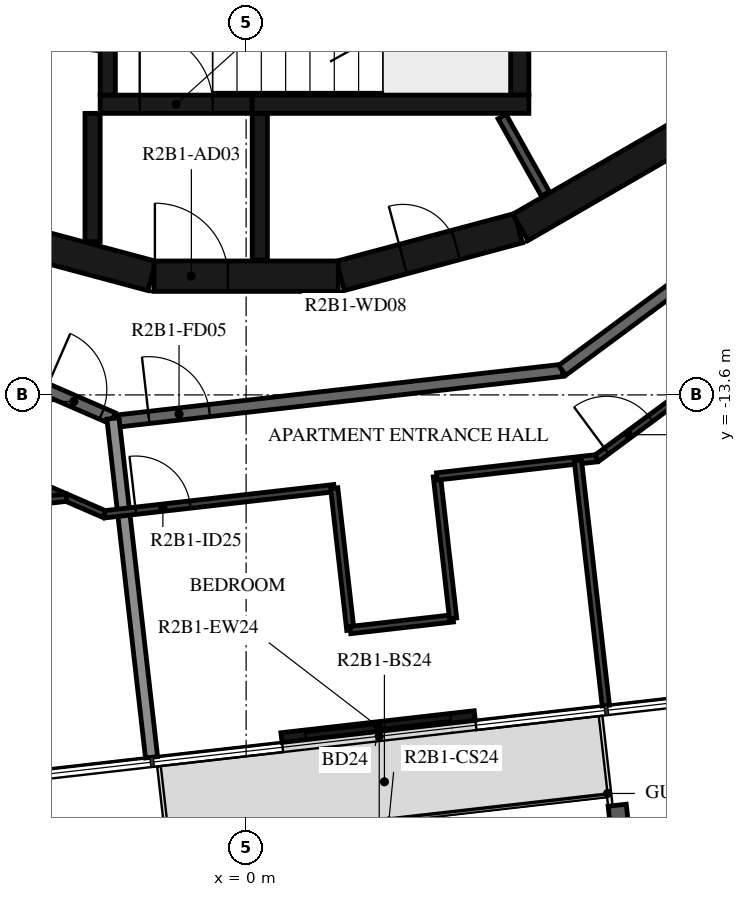
"""IFC4 building model, lengths in metres.
Left out: names, types, materials, properties, quantities, classifications, styles, units other than length and angle.
Written with IfcOpenShell. Run it as: python <this file> out.ifc"""

import sys

from ifc_helpers import new_model, si_unit, direction, frame, frame_2d, origin, origin_2d, place, context, subcontext, project, spatial, rectangle, i_section, extrude, element, fill, save


model = new_model("IFC4")
c1 = context("Model", 3, precision=1e-05, world=origin(), true_north=direction((0.0, 1.0)))
c2 = subcontext(c1, "Body", "Model", "MODEL_VIEW")
j1 = project(units=[si_unit("LENGTHUNIT", "METRE"), si_unit("PLANEANGLEUNIT", "RADIAN")], contexts=[c1])
p1 = place(None, origin())
s1 = spatial("IfcSite", under=j1, at=p1, CompositionType="ELEMENT")
p2 = place(p1, origin())
s2 = spatial("IfcBuilding", under=s1, at=p2, CompositionType="ELEMENT")
p3 = place(p2, frame((0.0, 0.0, 87.2)))
s3 = spatial("IfcBuildingStorey", under=s2, at=p3, CompositionType="ELEMENT", Elevation=87.2)
p4 = place(p3, frame((6.153, -20.795, -0.38), z_axis=(0.0, 0.0, 1.0), x_axis=(-0.993571881569, -0.113202986513, 0.0)))
e1 = element("IfcColumn", 1, at=p4, inside=s3, PredefinedType="COLUMN", context=c2, shape_type="SweptSolid", body=[
    extrude(i_section(OverallWidth=0.3, OverallDepth=0.9, WebThickness=0.019, FlangeThickness=0.035, FilletRadius=0.03, at=origin_2d()), origin(), (0.0, 0.0, 1.0), 3.5),
])
p5 = place(p3, frame((0.581, -19.235, 0.0), z_axis=(0.0, 0.0, 1.0), x_axis=(0.993569997097, 0.113219525124, 0.0)))
e2 = element("IfcWall", 2, at=p5, inside=s3, PredefinedType="STANDARD", context=c2, shape_type="SweptSolid", body=[
    extrude(rectangle(XDim=3.2, YDim=0.16, at=frame_2d((1.6, 0.0))), origin(), (0.0, 0.0, 1.0), 3.12),
])
p6 = place(p5, frame((0.4, 0.0, 0.0)))
e3 = element("IfcOpeningElement", 3, at=p6, cuts=e2, PredefinedType="OPENING", context=c2, shape_type="SweptSolid", body=[
    extrude(rectangle(XDim=2.4, YDim=2.4, at=frame_2d((1.2, 1.2))), frame((0.0, 0.09, 0.0), z_axis=(0.0, -1.0, 0.0), x_axis=(1.0, 0.0, 0.0)), (0.0, 0.0, 1.0), 0.18),
])
p7 = place(p3, frame((1.55, -11.643, 0.0), z_axis=(0.0, 0.0, 1.0), x_axis=(0.965948410781, 0.258734743916, 0.0)))
e4 = element("IfcWall", 4, at=p7, inside=s3, PredefinedType="SHEAR", context=c2, shape_type="SweptSolid", body=[
    extrude(rectangle(XDim=3.033, YDim=0.5, at=frame_2d((1.516, 0.0))), origin(), (0.0, 0.0, 1.0), 3.12),
])
p8 = place(p7, frame((1.066, 0.0, 0.0)))
e5 = element("IfcOpeningElement", 5, at=p8, cuts=e4, PredefinedType="OPENING", context=c2, shape_type="SweptSolid", body=[
    extrude(rectangle(XDim=0.9, YDim=2.1, at=frame_2d((0.45, 1.05))), frame((0.0, 0.26, 0.0), z_axis=(0.0, -1.0, 0.0), x_axis=(1.0, 0.0, 0.0)), (0.0, 0.0, 1.0), 0.52),
])
for number, where, z_axis, x_axis in (
    (6, (4.51, -10.845, 0.0), (0.0, 0.0, 1.0), (0.866, 0.5, 0.0)),
    (7, (-4.479, -10.858, 0.0), (0.0, 0.0, 1.0), (0.966, -0.259, 0.0)),
):
    element("IfcWall", number, at=place(p3, frame(where, z_axis=z_axis, x_axis=x_axis)), inside=s3, PredefinedType="SHEAR", context=c2, shape_type="SweptSolid", body=[
        extrude(rectangle(XDim=3.033, YDim=0.5, at=frame_2d((1.516, 0.0))), origin(), (0.0, 0.0, 1.0), 3.12),
    ])
p9 = place(p3, frame((-1.516, -11.647, 0.0), z_axis=(0.0, 0.0, 1.0), x_axis=(1.0, 0.0, 0.0)))
e8 = element("IfcWall", 8, at=p9, inside=s3, PredefinedType="SHEAR", context=c2, shape_type="SweptSolid", body=[
    extrude(rectangle(XDim=3.033, YDim=0.5, at=frame_2d((1.516, 0.0))), origin(), (0.0, 0.0, 1.0), 3.12),
])
p10 = place(p9, frame((0.016, 0.0, 0.0)))
e9 = element("IfcOpeningElement", 9, at=p10, cuts=e8, PredefinedType="OPENING", context=c2, shape_type="SweptSolid", body=[
    extrude(rectangle(XDim=1.2, YDim=2.1, at=frame_2d((0.6, 1.05))), frame((0.0, 0.26, 0.0), z_axis=(0.0, -1.0, 0.0), x_axis=(1.0, 0.0, 0.0)), (0.0, 0.0, 1.0), 0.52),
])
p11 = place(p3, frame((-2.275, -8.67, 0.0), z_axis=(0.0, 0.0, 1.0), x_axis=(0.0, 1.0, 0.0)))
e10 = element("IfcWall", 10, at=p11, inside=s3, PredefinedType="SHEAR", context=c2, shape_type="SweptSolid", body=[
    extrude(rectangle(XDim=3.32, YDim=0.25, at=frame_2d((1.66, 0.0))), origin(), (0.0, 0.0, 1.0), 3.12),
])
p12 = place(p3, frame((4.5, -8.67, 0.0), z_axis=(0.0, 0.0, 1.0), x_axis=(0.0, 1.0, 0.0)))
e11 = element("IfcWall", 11, at=p12, inside=s3, PredefinedType="SHEAR", context=c2, shape_type="SweptSolid", body=[
    extrude(rectangle(XDim=3.32, YDim=0.3, at=frame_2d((1.66, 0.0))), origin(), (0.0, 0.0, 1.0), 3.12),
])
p13 = place(p3, frame((0.1, -8.82, 0.0), z_axis=(0.0, 0.0, 1.0), x_axis=(1.0, 0.0, 0.0)))
e12 = element("IfcWall", 12, at=p13, inside=s3, PredefinedType="SHEAR", context=c2, shape_type="SweptSolid", body=[
    extrude(rectangle(XDim=4.55, YDim=0.3, at=frame_2d((2.275, 0.0))), origin(), (0.0, 0.0, 1.0), 3.12),
])
p14 = place(p3, frame((-2.4, -8.82, 0.0), z_axis=(0.0, 0.0, 1.0), x_axis=(1.0, 0.0, 0.0)))
e13 = element("IfcWall", 13, at=p14, inside=s3, PredefinedType="SHEAR", context=c2, shape_type="SweptSolid", body=[
    extrude(rectangle(XDim=2.5, YDim=0.3, at=frame_2d((1.25, 0.0))), origin(), (0.0, 0.0, 1.0), 3.12),
])
p15 = place(p14, frame((0.65, 0.0, 0.0)))
e14 = element("IfcOpeningElement", 14, at=p15, cuts=e13, PredefinedType="OPENING", context=c2, shape_type="SweptSolid", body=[
    extrude(rectangle(XDim=1.2, YDim=2.1, at=frame_2d((0.6, 1.05))), frame((0.0, 0.16, 0.0), z_axis=(0.0, -1.0, 0.0), x_axis=(1.0, 0.0, 0.0)), (0.0, 0.0, 1.0), 0.32),
])
p16 = place(p3, frame((-2.525, -8.97, 0.0), z_axis=(0.0, 0.0, 1.0), x_axis=(0.0, -1.0, 0.0)))
e15 = element("IfcWall", 15, at=p16, inside=s3, PredefinedType="SHEAR", context=c2, shape_type="SweptSolid", body=[
    extrude(rectangle(XDim=2.11, YDim=0.25, at=frame_2d((1.055, 0.0))), origin(), (0.0, 0.0, 1.0), 3.12),
])
p17 = place(p3, frame((0.225, -8.97, 0.0), z_axis=(0.0, 0.0, 1.0), x_axis=(0.0, -1.0, 0.0)))
e16 = element("IfcWall", 16, at=p17, inside=s3, PredefinedType="SHEAR", context=c2, shape_type="SweptSolid", body=[
    extrude(rectangle(XDim=2.41, YDim=0.25, at=frame_2d((1.205, 0.0))), origin(), (0.0, 0.0, 1.0), 3.12),
])
p18 = place(p3, frame((4.922, -10.296, 0.0), z_axis=(0.0, 0.0, 1.0), x_axis=(-0.48860846254, 0.872503163509, 0.0)))
e17 = element("IfcWall", 17, at=p18, inside=s3, PredefinedType="PARTITIONING", context=c2, shape_type="SweptSolid", body=[
    extrude(rectangle(XDim=1.459, YDim=0.15, at=frame_2d((0.73, 0.0))), origin(), (0.0, 0.0, 1.0), 3.12),
])
p19 = place(p3, frame((-8.829, -11.1, 0.0), z_axis=(0.0, 0.0, 1.0), x_axis=(0.917063622491, -0.398740908742, 0.0)))
e18 = element("IfcWall", 18, at=p19, inside=s3, PredefinedType="STANDARD", context=c2, shape_type="SweptSolid", body=[
    extrude(rectangle(XDim=7.24, YDim=0.2, at=frame_2d((3.62, 0.0))), origin(), (0.0, 0.0, 1.0), 3.12),
])
p20 = place(p19, frame((6.04, 0.0, 0.0)))
e19 = element("IfcOpeningElement", 19, at=p20, cuts=e18, PredefinedType="OPENING", context=c2, shape_type="SweptSolid", body=[
    extrude(rectangle(XDim=1.0, YDim=2.1, at=frame_2d((0.5, 1.05))), frame((0.0, 0.11, 0.0), z_axis=(0.0, -1.0, 0.0), x_axis=(1.0, 0.0, 0.0)), (0.0, 0.0, 1.0), 0.22),
])
p21 = place(p3, frame((-2.096, -14.028, 0.0), z_axis=(0.0, 0.0, 1.0), x_axis=(0.993569170114, 0.113226782163, 0.0)))
e20 = element("IfcWall", 20, at=p21, inside=s3, PredefinedType="STANDARD", context=c2, shape_type="SweptSolid", body=[
    extrude(rectangle(XDim=7.342, YDim=0.2, at=frame_2d((3.671, 0.0))), origin(), (0.0, 0.0, 1.0), 3.12),
])
p22 = place(p21, frame((0.5, 0.0, 0.0)))
e21 = element("IfcOpeningElement", 21, at=p22, cuts=e20, PredefinedType="OPENING", context=c2, shape_type="SweptSolid", body=[
    extrude(rectangle(XDim=1.0, YDim=2.1, at=frame_2d((0.5, 1.05))), frame((0.0, 0.11, 0.0), z_axis=(0.0, -1.0, 0.0), x_axis=(1.0, 0.0, 0.0)), (0.0, 0.0, 1.0), 0.22),
])
p23 = place(p3, frame((5.198, -13.196, 0.0), z_axis=(0.0, 0.0, 1.0), x_axis=(0.803869883159, 0.594805187394, 0.0)))
e22 = element("IfcWall", 22, at=p23, inside=s3, PredefinedType="STANDARD", context=c2, shape_type="SweptSolid", body=[
    extrude(rectangle(XDim=7.342, YDim=0.2, at=frame_2d((3.671, 0.0))), origin(), (0.0, 0.0, 1.0), 3.12),
])
p24 = place(p3, frame((-1.555, -19.559, 0.0), z_axis=(0.0, 0.0, 1.0), x_axis=(-0.113221250863, 0.993569800443, 0.0)))
e23 = element("IfcWall", 23, at=p24, inside=s3, PredefinedType="STANDARD", context=c2, shape_type="SweptSolid", body=[
    extrude(rectangle(XDim=5.609, YDim=0.2, at=frame_2d((2.804, 0.0))), origin(), (0.0, 0.0, 1.0), 2.73),
])
p25 = place(p3, frame((-9.796, -12.315, 0.0), z_axis=(0.0, 0.0, 1.0), x_axis=(0.917059572812, -0.398750222463, 0.0)))
e24 = element("IfcWall", 24, at=p25, inside=s3, PredefinedType="PARTITIONING", context=c2, shape_type="SweptSolid", body=[
    extrude(rectangle(XDim=8.146, YDim=0.12, at=frame_2d((4.073, 0.0))), origin(), (0.0, 0.0, 1.0), 3.12),
])
p26 = place(p25, frame((0.969, 0.0, 0.0)))
e25 = element("IfcOpeningElement", 25, at=p26, cuts=e24, PredefinedType="OPENING", context=c2, shape_type="SweptSolid", body=[
    extrude(rectangle(XDim=0.8, YDim=2.1, at=frame_2d((0.4, 1.05))), frame((0.0, 0.07, 0.0), z_axis=(0.0, -1.0, 0.0), x_axis=(1.0, 0.0, 0.0)), (0.0, 0.0, 1.0), 0.14),
])
p27 = place(p3, frame((-2.326, -15.563, 0.0), z_axis=(0.0, 0.0, 1.0), x_axis=(0.993575068384, 0.113175012641, 0.0)))
e26 = element("IfcWall", 26, at=p27, inside=s3, PredefinedType="PARTITIONING", context=c2, shape_type="SweptSolid", body=[
    extrude(rectangle(XDim=3.799, YDim=0.12, at=frame_2d((1.899, 0.0))), origin(), (0.0, 0.0, 1.0), 3.12),
])
p28 = place(p27, frame((0.513, 0.0, 0.0)))
e27 = element("IfcOpeningElement", 27, at=p28, cuts=e26, PredefinedType="OPENING", context=c2, shape_type="SweptSolid", body=[
    extrude(rectangle(XDim=0.9, YDim=2.1, at=frame_2d((0.45, 1.05))), frame((0.0, 0.07, 0.0), z_axis=(0.0, -1.0, 0.0), x_axis=(1.0, 0.0, 0.0)), (0.0, 0.0, 1.0), 0.14),
])
p29 = place(p3, frame((-17.437, -16.94, 0.0), z_axis=(0.0, 0.0, 1.0), x_axis=(0.993573314119, 0.113190412448, 0.0)))
e28 = element("IfcWall", 28, at=p29, inside=s3, PredefinedType="PARTITIONING", context=c2, shape_type="SweptSolid", body=[
    extrude(rectangle(XDim=14.576, YDim=0.12, at=frame_2d((7.288, 0.0))), origin(), (0.0, 0.0, 1.0), 3.12),
])
p30 = place(p29, frame((3.201, 0.0, 0.0)))
e29 = element("IfcOpeningElement", 29, at=p30, cuts=e28, PredefinedType="OPENING", context=c2, shape_type="SweptSolid", body=[
    extrude(rectangle(XDim=0.9, YDim=2.1, at=frame_2d((0.45, 1.05))), frame((0.0, 0.07, 0.0), z_axis=(0.0, -1.0, 0.0), x_axis=(1.0, 0.0, 0.0)), (0.0, 0.0, 1.0), 0.14),
])
p31 = place(p29, frame((0.2, 0.0, 0.0)))
e30 = element("IfcOpeningElement", 30, at=p31, cuts=e28, PredefinedType="OPENING", context=c2, shape_type="SweptSolid", body=[
    extrude(rectangle(XDim=0.9, YDim=2.1, at=frame_2d((0.45, 1.05))), frame((0.0, 0.07, 0.0), z_axis=(0.0, -1.0, 0.0), x_axis=(1.0, 0.0, 0.0)), (0.0, 0.0, 1.0), 0.14),
])
p32 = place(p3, frame((1.448, -15.133, 0.0), z_axis=(0.0, 0.0, 1.0), x_axis=(0.113180189053, -0.993574478741, 0.0)))
e31 = element("IfcWall", 31, at=p32, inside=s3, PredefinedType="PARTITIONING", context=c2, shape_type="SweptSolid", body=[
    extrude(rectangle(XDim=2.349, YDim=0.12, at=frame_2d((1.175, 0.0))), origin(), (0.0, 0.0, 1.0), 3.12),
])
p33 = place(p3, frame((1.714, -17.467, 0.0), z_axis=(0.0, 0.0, 1.0), x_axis=(0.993577030812, 0.113157782957, 0.0)))
e32 = element("IfcWall", 32, at=p33, inside=s3, PredefinedType="PARTITIONING", context=c2, shape_type="SweptSolid", body=[
    extrude(rectangle(XDim=1.7, YDim=0.12, at=frame_2d((0.85, 0.0))), origin(), (0.0, 0.0, 1.0), 3.12),
])
p34 = place(p3, frame((3.404, -17.275, 0.0), z_axis=(0.0, 0.0, 1.0), x_axis=(-0.113180189053, 0.993574478741, 0.0)))
e33 = element("IfcWall", 33, at=p34, inside=s3, PredefinedType="PARTITIONING", context=c2, shape_type="SweptSolid", body=[
    extrude(rectangle(XDim=2.349, YDim=0.12, at=frame_2d((1.175, 0.0))), origin(), (0.0, 0.0, 1.0), 3.12),
])
p35 = place(p3, frame((3.138, -14.941, 0.0), z_axis=(0.0, 0.0, 1.0), x_axis=(0.99356355736, 0.113276023437, 0.0)))
e34 = element("IfcWall", 34, at=p35, inside=s3, PredefinedType="PARTITIONING", context=c2, shape_type="SweptSolid", body=[
    extrude(rectangle(XDim=2.647, YDim=0.12, at=frame_2d((1.323, 0.0))), origin(), (0.0, 0.0, 1.0), 3.12),
])
p36 = place(p3, frame((5.767, -14.641, 0.0), z_axis=(0.0, 0.0, 1.0), x_axis=(0.803867427863, 0.594808505673, 0.0)))
e35 = element("IfcWall", 35, at=p36, inside=s3, PredefinedType="PARTITIONING", context=c2, shape_type="SweptSolid", body=[
    extrude(rectangle(XDim=7.316, YDim=0.12, at=frame_2d((3.658, 0.0))), origin(), (0.0, 0.0, 1.0), 3.12),
])
p37 = place(p36, frame((0.2, 0.0, 0.0)))
e36 = element("IfcOpeningElement", 36, at=p37, cuts=e35, PredefinedType="OPENING", context=c2, shape_type="SweptSolid", body=[
    extrude(rectangle(XDim=0.9, YDim=2.1, at=frame_2d((0.45, 1.05))), frame((0.0, 0.07, 0.0), z_axis=(0.0, -1.0, 0.0), x_axis=(1.0, 0.0, 0.0)), (0.0, 0.0, 1.0), 0.14),
])
p38 = place(p36, frame((5.385, 0.0, 0.0)))
e37 = element("IfcOpeningElement", 37, at=p38, cuts=e35, PredefinedType="OPENING", context=c2, shape_type="SweptSolid", body=[
    extrude(rectangle(XDim=0.8, YDim=2.1, at=frame_2d((0.4, 1.05))), frame((0.0, 0.07, 0.0), z_axis=(0.0, -1.0, 0.0), x_axis=(1.0, 0.0, 0.0)), (0.0, 0.0, 1.0), 0.14),
])
p39 = place(p3, frame((5.915, -18.708, 0.0), z_axis=(0.0, 0.0, 1.0), x_axis=(-0.113244511591, 0.993567149515, 0.0)))
e38 = element("IfcWall", 38, at=p39, inside=s3, PredefinedType="PARTITIONING", context=c2, shape_type="SweptSolid", body=[
    extrude(rectangle(XDim=4.057, YDim=0.12, at=frame_2d((2.029, 0.0))), origin(), (0.0, 0.0, 1.0), 2.73),
])
p40 = place(p6, origin())
e39 = element("IfcDoor", 39, at=p40, inside=s3, OperationType="DOUBLE_DOOR_SLIDING", PredefinedType="DOOR", context=c2, shape_type="SweptSolid", body=[
    extrude(rectangle(XDim=2.4, YDim=2.4, at=frame_2d((1.2, 1.2))), frame((0.0, 0.025, 0.0), z_axis=(0.0, -1.0, 0.0), x_axis=(1.0, 0.0, 0.0)), (0.0, 0.0, 1.0), 0.05),
])
fill(e3, e39)
p41 = place(p15, origin())
e40 = element("IfcDoor", 40, at=p41, inside=s3, OperationType="SINGLE_SWING_LEFT", PredefinedType="DOOR", context=c2, shape_type="SweptSolid", body=[
    extrude(rectangle(XDim=1.2, YDim=2.1, at=frame_2d((0.6, 1.05))), frame((0.0, 0.025, 0.0), z_axis=(0.0, -1.0, 0.0), x_axis=(1.0, 0.0, 0.0)), (0.0, 0.0, 1.0), 0.05),
])
fill(e14, e40)
p42 = place(p10, origin())
e41 = element("IfcDoor", 41, at=p42, inside=s3, OperationType="SINGLE_SWING_RIGHT", PredefinedType="DOOR", context=c2, shape_type="SweptSolid", body=[
    extrude(rectangle(XDim=1.2, YDim=2.1, at=frame_2d((0.6, 1.05))), frame((0.0, 0.025, 0.0), z_axis=(0.0, -1.0, 0.0), x_axis=(1.0, 0.0, 0.0)), (0.0, 0.0, 1.0), 0.05),
])
fill(e9, e41)
p43 = place(p8, origin())
e42 = element("IfcDoor", 42, at=p43, inside=s3, OperationType="SINGLE_SWING_LEFT", PredefinedType="DOOR", context=c2, shape_type="SweptSolid", body=[
    extrude(rectangle(XDim=0.9, YDim=2.1, at=frame_2d((0.45, 1.05))), frame((0.0, 0.025, 0.0), z_axis=(0.0, -1.0, 0.0), x_axis=(1.0, 0.0, 0.0)), (0.0, 0.0, 1.0), 0.05),
])
fill(e5, e42)
p44 = place(p20, origin())
e43 = element("IfcDoor", 43, at=p44, inside=s3, OperationType="SINGLE_SWING_LEFT", PredefinedType="DOOR", context=c2, shape_type="SweptSolid", body=[
    extrude(rectangle(XDim=1.0, YDim=2.1, at=frame_2d((0.5, 1.05))), frame((0.0, 0.025, 0.0), z_axis=(0.0, -1.0, 0.0), x_axis=(1.0, 0.0, 0.0)), (0.0, 0.0, 1.0), 0.05),
])
fill(e19, e43)
p45 = place(p22, origin())
e44 = element("IfcDoor", 44, at=p45, inside=s3, OperationType="SINGLE_SWING_LEFT", PredefinedType="DOOR", context=c2, shape_type="SweptSolid", body=[
    extrude(rectangle(XDim=1.0, YDim=2.1, at=frame_2d((0.5, 1.05))), frame((0.0, 0.025, 0.0), z_axis=(0.0, -1.0, 0.0), x_axis=(1.0, 0.0, 0.0)), (0.0, 0.0, 1.0), 0.05),
])
fill(e21, e44)
p46 = place(p28, origin())
e45 = element("IfcDoor", 45, at=p46, inside=s3, OperationType="SINGLE_SWING_LEFT", PredefinedType="DOOR", context=c2, shape_type="SweptSolid", body=[
    extrude(rectangle(XDim=0.9, YDim=2.1, at=frame_2d((0.45, 1.05))), frame((0.0, 0.025, 0.0), z_axis=(0.0, -1.0, 0.0), x_axis=(1.0, 0.0, 0.0)), (0.0, 0.0, 1.0), 0.05),
])
fill(e27, e45)
p47 = place(p37, origin())
e46 = element("IfcDoor", 46, at=p47, inside=s3, OperationType="SINGLE_SWING_RIGHT", PredefinedType="DOOR", context=c2, shape_type="SweptSolid", body=[
    extrude(rectangle(XDim=0.9, YDim=2.1, at=frame_2d((0.45, 1.05))), frame((0.0, 0.025, 0.0), z_axis=(0.0, -1.0, 0.0), x_axis=(1.0, 0.0, 0.0)), (0.0, 0.0, 1.0), 0.05),
])
fill(e36, e46)
save(model, sys.argv[1])
